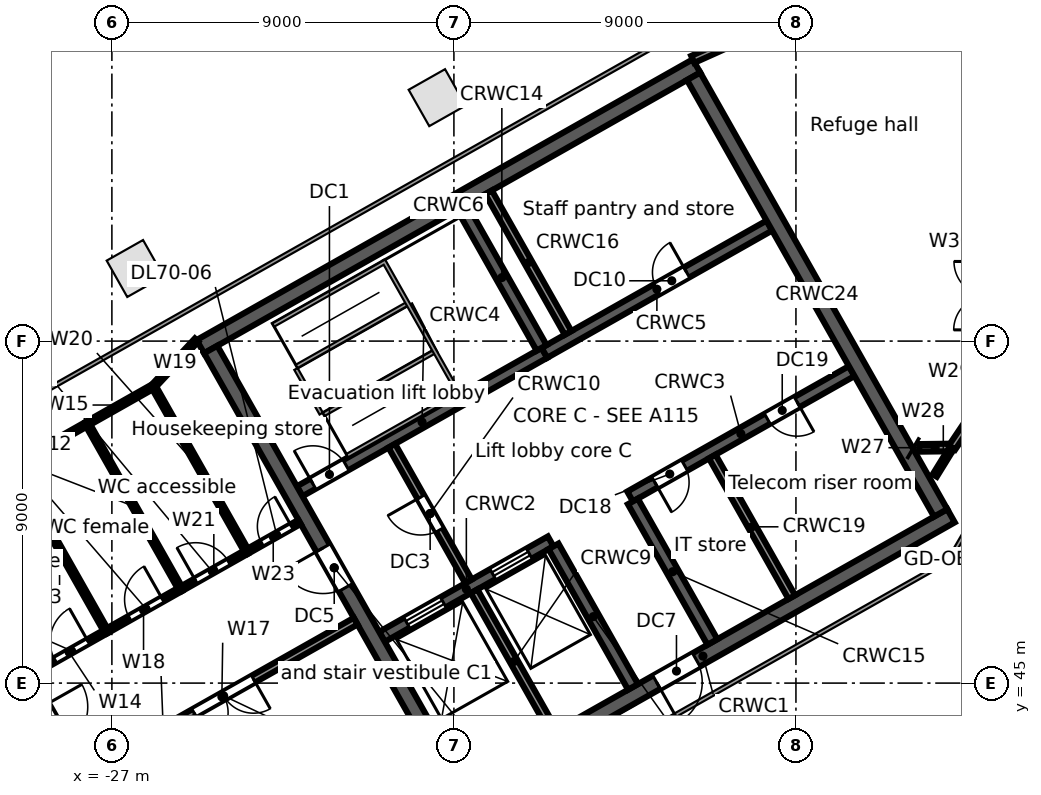
"""IFC4 building model, lengths in metres.
Left out: names, types, materials, properties, quantities, classifications, styles, units other than length and angle.
Written with IfcOpenShell. Run it as: python <this file> out.ifc"""

import sys

from ifc_helpers import new_model, si_unit, direction, frame, frame_2d, origin, origin_2d, place, context, subcontext, project, spatial, rectangle, extrude, element, fill, save


model = new_model("IFC4")
c1 = context("Model", 3, precision=1e-05, world=origin(), true_north=direction((0.0, 1.0)))
c2 = subcontext(c1, "Body", "Model", "MODEL_VIEW")
j1 = project(units=[si_unit("LENGTHUNIT", "METRE"), si_unit("PLANEANGLEUNIT", "RADIAN")], contexts=[c1])
p1 = place(None, origin())
s1 = spatial("IfcSite", under=j1, at=p1, CompositionType="ELEMENT")
p2 = place(p1, origin())
s2 = spatial("IfcBuilding", under=s1, at=p2, CompositionType="ELEMENT")
p3 = place(p2, frame((0.0, 0.0, 312.1)))
s3 = spatial("IfcBuildingStorey", under=s2, at=p3, CompositionType="ELEMENT", Elevation=312.1)
for number, where, z_axis, x_axis in (
    (1, (-18.441, 60.406, 0.0), (0.0, 0.0, 1.0), (-0.87, -0.492, 0.0)),
    (2, (-26.388, 55.91, 0.0), (0.0, 0.0, 1.0), (-0.87, -0.492, 0.0)),
):
    element("IfcColumn", number, at=place(p3, frame(where, z_axis=z_axis, x_axis=x_axis)), inside=s3, PredefinedType="COLUMN", context=c2, shape_type="SweptSolid", body=[
        extrude(rectangle(XDim=1.1, YDim=1.1, at=origin_2d()), origin(), (0.0, 0.0, 1.0), 4.4),
    ])
p4 = place(p3, frame((-31.79, 49.597, 0.0), z_axis=(0.0, 0.0, 1.0), x_axis=(0.492421663121, -0.870356769198, 0.0)))
e3 = element("IfcWall", 3, at=p4, inside=s3, PredefinedType="SOLIDWALL", context=c2, shape_type="SweptSolid", body=[
    extrude(rectangle(XDim=13.2, YDim=0.4, at=frame_2d((6.6, 0.0))), origin(), (0.0, 0.0, 1.0), 4.12),
])
p5 = place(p4, frame((6.0, 0.0, 0.0)))
e4 = element("IfcOpeningElement", 4, at=p5, cuts=e3, PredefinedType="OPENING", context=c2, shape_type="SweptSolid", body=[
    extrude(rectangle(XDim=1.2, YDim=2.1, at=frame_2d((0.6, 1.05))), frame((0.0, 0.21, 0.0), z_axis=(0.0, -1.0, 0.0), x_axis=(1.0, 0.0, 0.0)), (0.0, 0.0, 1.0), 0.42),
])
p6 = place(p3, frame((-17.975, 42.017, 0.0), z_axis=(0.0, 0.0, 1.0), x_axis=(0.87034965173, 0.492434243055, 0.0)))
e5 = element("IfcWall", 5, at=p6, inside=s3, PredefinedType="SOLIDWALL", context=c2, shape_type="SweptSolid", body=[
    extrude(rectangle(XDim=15.0, YDim=0.4, at=frame_2d((7.5, 0.0))), origin(), (0.0, 0.0, 1.0), 4.12),
])
p7 = place(p6, frame((6.1, 0.0, 0.0)))
e6 = element("IfcOpeningElement", 6, at=p7, cuts=e5, PredefinedType="OPENING", context=c2, shape_type="SweptSolid", body=[
    extrude(rectangle(XDim=1.2, YDim=2.1, at=frame_2d((0.6, 1.05))), frame((0.0, 0.21, 0.0), z_axis=(0.0, -1.0, 0.0), x_axis=(1.0, 0.0, 0.0)), (0.0, 0.0, 1.0), 0.42),
])
p8 = place(p3, frame((-19.892, 46.218, 0.0), z_axis=(0.0, 0.0, 1.0), x_axis=(0.870341639186, 0.492448404505, 0.0)))
e7 = element("IfcWall", 7, at=p8, inside=s3, PredefinedType="SOLIDWALL", context=c2, shape_type="SweptSolid", body=[
    extrude(rectangle(XDim=5.1, YDim=0.3, at=frame_2d((2.55, 0.0))), origin(), (0.0, 0.0, 1.0), 4.12),
])
p9 = place(p8, frame((0.75, 0.0, 0.0)))
e8 = element("IfcOpeningElement", 8, at=p9, cuts=e7, PredefinedType="OPENING", context=c2, shape_type="SweptSolid", body=[
    extrude(rectangle(XDim=1.1, YDim=2.1, at=frame_2d((0.55, 1.05))), frame((0.0, 0.16, 0.0), z_axis=(0.0, -1.0, 0.0), x_axis=(1.0, 0.0, 0.0)), (0.0, 0.0, 1.0), 0.32),
])
p10 = place(p8, frame((3.35, 0.0, 0.0)))
e9 = element("IfcOpeningElement", 9, at=p10, cuts=e7, PredefinedType="OPENING", context=c2, shape_type="SweptSolid", body=[
    extrude(rectangle(XDim=1.1, YDim=2.1, at=frame_2d((0.55, 1.05))), frame((0.0, 0.16, 0.0), z_axis=(0.0, -1.0, 0.0), x_axis=(1.0, 0.0, 0.0)), (0.0, 0.0, 1.0), 0.32),
])
p11 = place(p3, frame((-13.365, 49.911, 0.0), z_axis=(0.0, 0.0, 1.0), x_axis=(0.870347618718, 0.492437836272, 0.0)))
e10 = element("IfcWall", 10, at=p11, inside=s3, PredefinedType="SOLIDWALL", context=c2, shape_type="SweptSolid", body=[
    extrude(rectangle(XDim=6.7, YDim=0.3, at=frame_2d((3.35, 0.0))), origin(), (0.0, 0.0, 1.0), 4.12),
])
p12 = place(p11, frame((0.75, 0.0, 0.0)))
e11 = element("IfcOpeningElement", 11, at=p12, cuts=e10, PredefinedType="OPENING", context=c2, shape_type="SweptSolid", body=[
    extrude(rectangle(XDim=0.9, YDim=2.1, at=frame_2d((0.45, 1.05))), frame((0.0, 0.16, 0.0), z_axis=(0.0, -1.0, 0.0), x_axis=(1.0, 0.0, 0.0)), (0.0, 0.0, 1.0), 0.32),
])
p13 = place(p11, frame((4.15, 0.0, 0.0)))
e12 = element("IfcOpeningElement", 12, at=p13, cuts=e10, PredefinedType="OPENING", context=c2, shape_type="SweptSolid", body=[
    extrude(rectangle(XDim=0.9, YDim=2.1, at=frame_2d((0.45, 1.05))), frame((0.0, 0.16, 0.0), z_axis=(0.0, -1.0, 0.0), x_axis=(1.0, 0.0, 0.0)), (0.0, 0.0, 1.0), 0.32),
])
p14 = place(p3, frame((-22.059, 50.047, 0.0), z_axis=(0.0, 0.0, 1.0), x_axis=(0.87035077051, 0.49243226567, 0.0)))
e13 = element("IfcWall", 13, at=p14, inside=s3, PredefinedType="SOLIDWALL", context=c2, shape_type="SweptSolid", body=[
    extrude(rectangle(XDim=7.4, YDim=0.3, at=frame_2d((3.7, 0.0))), origin(), (0.0, 0.0, 1.0), 4.12),
])
p15 = place(p14, frame((0.4, 0.0, 0.0)))
e14 = element("IfcOpeningElement", 14, at=p15, cuts=e13, PredefinedType="OPENING", context=c2, shape_type="SweptSolid", body=[
    extrude(rectangle(XDim=1.0, YDim=2.1, at=frame_2d((0.5, 1.05))), frame((0.0, 0.16, 0.0), z_axis=(0.0, -1.0, 0.0), x_axis=(1.0, 0.0, 0.0)), (0.0, 0.0, 1.0), 0.32),
])
p16 = place(p3, frame((-15.618, 53.691, 0.0), z_axis=(0.0, 0.0, 1.0), x_axis=(0.870362830851, 0.492410948978, 0.0)))
e15 = element("IfcWall", 15, at=p16, inside=s3, PredefinedType="SOLIDWALL", context=c2, shape_type="SweptSolid", body=[
    extrude(rectangle(XDim=6.8, YDim=0.3, at=frame_2d((3.4, 0.0))), origin(), (0.0, 0.0, 1.0), 4.12),
])
p17 = place(p16, frame((3.4, 0.0, 0.0)))
e16 = element("IfcOpeningElement", 16, at=p17, cuts=e15, PredefinedType="OPENING", context=c2, shape_type="SweptSolid", body=[
    extrude(rectangle(XDim=0.9, YDim=2.1, at=frame_2d((0.45, 1.05))), frame((0.0, 0.16, 0.0), z_axis=(0.0, -1.0, 0.0), x_axis=(1.0, 0.0, 0.0)), (0.0, 0.0, 1.0), 0.32),
])
p18 = place(p3, frame((-24.672, 53.854, 0.0), z_axis=(0.0, 0.0, 1.0), x_axis=(0.870353598469, 0.492427267353, 0.0)))
e17 = element("IfcWall", 17, at=p18, inside=s3, PredefinedType="SOLIDWALL", context=c2, shape_type="SweptSolid", body=[
    extrude(rectangle(XDim=15.0, YDim=0.4, at=frame_2d((7.5, 0.0))), origin(), (0.0, 0.0, 1.0), 4.12),
])
p19 = place(p3, frame((-24.4, 53.779, 0.0), z_axis=(0.0, 0.0, 1.0), x_axis=(0.492421663121, -0.870356769198, 0.0)))
e18 = element("IfcWall", 18, at=p19, inside=s3, PredefinedType="SOLIDWALL", context=c2, shape_type="SweptSolid", body=[
    extrude(rectangle(XDim=13.2, YDim=0.4, at=frame_2d((6.6, 0.0))), origin(), (0.0, 0.0, 1.0), 4.12),
])
p20 = place(p19, frame((6.0, 0.0, 0.0)))
e19 = element("IfcOpeningElement", 19, at=p20, cuts=e18, PredefinedType="OPENING", context=c2, shape_type="SweptSolid", body=[
    extrude(rectangle(XDim=1.2, YDim=2.1, at=frame_2d((0.6, 1.05))), frame((0.0, 0.21, 0.0), z_axis=(0.0, -1.0, 0.0), x_axis=(1.0, 0.0, 0.0)), (0.0, 0.0, 1.0), 0.42),
])
p21 = place(p3, frame((-17.469, 47.417, 0.0), z_axis=(0.0, 0.0, 1.0), x_axis=(0.492466057713, -0.870331650579, 0.0)))
e20 = element("IfcWall", 20, at=p21, inside=s3, PredefinedType="SOLIDWALL", context=c2, shape_type="SweptSolid", body=[
    extrude(rectangle(XDim=4.25, YDim=0.2, at=frame_2d((2.125, 0.0))), origin(), (0.0, 0.0, 1.0), 4.12),
])
p22 = place(p3, frame((-19.635, 51.246, 0.0), z_axis=(0.0, 0.0, 1.0), x_axis=(0.492408451753, -0.87036424366, 0.0)))
e21 = element("IfcWall", 21, at=p22, inside=s3, PredefinedType="PARTITIONING", context=c2, shape_type="SweptSolid", body=[
    extrude(rectangle(XDim=4.1, YDim=0.2, at=frame_2d((2.05, 0.0))), origin(), (0.0, 0.0, 1.0), 4.12),
])
p23 = place(p22, frame((1.55, 0.0, 0.0)))
e22 = element("IfcOpeningElement", 22, at=p23, cuts=e21, PredefinedType="OPENING", context=c2, shape_type="SweptSolid", body=[
    extrude(rectangle(XDim=1.0, YDim=2.1, at=frame_2d((0.5, 1.05))), frame((0.0, 0.11, 0.0), z_axis=(0.0, -1.0, 0.0), x_axis=(1.0, 0.0, 0.0)), (0.0, 0.0, 1.0), 0.22),
])
for number, where, z_axis, x_axis in (
    (23, (-15.379, 48.599, 0.0), (0.0, 0.0, 1.0), (0.492, -0.87, 0.0)),
    (24, (-17.785, 57.521, 0.0), (0.0, 0.0, 1.0), (0.492, -0.87, 0.0)),
):
    element("IfcWall", number, at=place(p3, frame(where, z_axis=z_axis, x_axis=x_axis)), inside=s3, PredefinedType="SOLIDWALL", context=c2, shape_type="SweptSolid", body=[
        extrude(rectangle(XDim=4.25, YDim=0.3, at=frame_2d((2.125, 0.0))), origin(), (0.0, 0.0, 1.0), 4.12),
    ])
p24 = place(p3, frame((-13.291, 49.781, 0.0), z_axis=(0.0, 0.0, 1.0), x_axis=(0.492397924348, -0.870370199454, 0.0)))
e25 = element("IfcWall", 25, at=p24, inside=s3, PredefinedType="SOLIDWALL", context=c2, shape_type="SweptSolid", body=[
    extrude(rectangle(XDim=4.25, YDim=0.3, at=frame_2d((2.125, 0.0))), origin(), (0.0, 0.0, 1.0), 4.12),
])
p25 = place(p3, frame((-17.089, 57.915, 0.0), z_axis=(0.0, 0.0, 1.0), x_axis=(0.492422543467, -0.870356271124, 0.0)))
e26 = element("IfcWall", 26, at=p25, inside=s3, PredefinedType="SOLIDWALL", context=c2, shape_type="SweptSolid", body=[
    extrude(rectangle(XDim=4.25, YDim=0.2, at=frame_2d((2.125, 0.0))), origin(), (0.0, 0.0, 1.0), 4.12),
])
p26 = place(p3, frame((-11.202, 50.962, 0.0), z_axis=(0.0, 0.0, 1.0), x_axis=(0.492441437811, -0.870345580977, 0.0)))
e27 = element("IfcWall", 27, at=p26, inside=s3, PredefinedType="PARTITIONING", context=c2, shape_type="SweptSolid", body=[
    extrude(rectangle(XDim=4.25, YDim=0.2, at=frame_2d((2.125, 0.0))), origin(), (0.0, 0.0, 1.0), 4.12),
])
p27 = place(p3, frame((-11.692, 60.968, 0.0), z_axis=(0.0, 0.0, 1.0), x_axis=(0.492421663121, -0.870356769198, 0.0)))
e28 = element("IfcWall", 28, at=p27, inside=s3, PredefinedType="SOLIDWALL", context=c2, shape_type="SweptSolid", body=[
    extrude(rectangle(XDim=13.2, YDim=0.4, at=frame_2d((6.6, 0.0))), origin(), (0.0, 0.0, 1.0), 4.12),
])
p28 = place(p3, frame((-29.608, 50.717, 0.0), z_axis=(0.0, 0.0, 1.0), x_axis=(0.870332332106, 0.492464853254, 0.0)))
e29 = element("IfcWall", 29, at=p28, inside=s3, PredefinedType="PARTITIONING", context=c2, shape_type="SweptSolid", body=[
    extrude(rectangle(XDim=2.25, YDim=0.125, at=frame_2d((1.125, 0.0))), origin(), (0.0, 0.0, 1.0), 4.12),
])
p29 = place(p3, frame((-29.608, 50.717, 0.0), z_axis=(0.0, 0.0, 1.0), x_axis=(0.492369352746, -0.870386362759, 0.0)))
e30 = element("IfcWall", 30, at=p29, inside=s3, PredefinedType="PARTITIONING", context=c2, shape_type="SweptSolid", body=[
    extrude(rectangle(XDim=5.0, YDim=0.125, at=frame_2d((2.5, 0.0))), origin(), (0.0, 0.0, 1.0), 4.12),
])
p30 = place(p3, frame((-29.104, 45.257, 0.0), z_axis=(0.0, 0.0, 1.0), x_axis=(0.870332332106, 0.492464853254, 0.0)))
e31 = element("IfcWall", 31, at=p30, inside=s3, PredefinedType="PARTITIONING", context=c2, shape_type="SweptSolid", body=[
    extrude(rectangle(XDim=2.25, YDim=0.125, at=frame_2d((1.125, 0.0))), origin(), (0.0, 0.0, 1.0), 4.12),
])
p31 = place(p30, frame((0.7, 0.0, 0.0)))
e32 = element("IfcOpeningElement", 32, at=p31, cuts=e31, PredefinedType="OPENING", context=c2, shape_type="SweptSolid", body=[
    extrude(rectangle(XDim=1.0, YDim=2.1, at=frame_2d((0.5, 1.05))), frame((0.0, 0.073, 0.0), z_axis=(0.0, -1.0, 0.0), x_axis=(1.0, 0.0, 0.0)), (0.0, 0.0, 1.0), 0.145),
])
p32 = place(p3, frame((-27.65, 51.825, 0.0), z_axis=(0.0, 0.0, 1.0), x_axis=(0.870330884088, 0.492467412326, 0.0)))
e33 = element("IfcWall", 33, at=p32, inside=s3, PredefinedType="PARTITIONING", context=c2, shape_type="SweptSolid", body=[
    extrude(rectangle(XDim=2.0, YDim=0.125, at=frame_2d((1.0, 0.0))), origin(), (0.0, 0.0, 1.0), 4.12),
])
p33 = place(p3, frame((-27.65, 51.825, 0.0), z_axis=(0.0, 0.0, 1.0), x_axis=(0.492369352746, -0.870386362759, 0.0)))
e34 = element("IfcWall", 34, at=p33, inside=s3, PredefinedType="PARTITIONING", context=c2, shape_type="SweptSolid", body=[
    extrude(rectangle(XDim=5.0, YDim=0.125, at=frame_2d((2.5, 0.0))), origin(), (0.0, 0.0, 1.0), 4.12),
])
p34 = place(p3, frame((-27.627, 42.646, 0.0), z_axis=(0.0, 0.0, 1.0), x_axis=(0.870370568162, 0.492397272614, 0.0)))
e35 = element("IfcWall", 35, at=p34, inside=s3, PredefinedType="PARTITIONING", context=c2, shape_type="SweptSolid", body=[
    extrude(rectangle(XDim=8.091, YDim=0.2, at=frame_2d((4.045, 0.0))), origin(), (0.0, 0.0, 1.0), 3.392),
])
p35 = place(p34, frame((3.2, 0.0, 0.0)))
e36 = element("IfcOpeningElement", 36, at=p35, cuts=e35, PredefinedType="OPENING", context=c2, shape_type="SweptSolid", body=[
    extrude(rectangle(XDim=1.8, YDim=2.1, at=frame_2d((0.9, 1.05))), frame((0.0, 0.11, 0.0), z_axis=(0.0, -1.0, 0.0), x_axis=(1.0, 0.0, 0.0)), (0.0, 0.0, 1.0), 0.22),
])
p36 = place(p3, frame((-27.146, 46.365, 0.0), z_axis=(0.0, 0.0, 1.0), x_axis=(0.870332332106, 0.492464853254, 0.0)))
e37 = element("IfcWall", 37, at=p36, inside=s3, PredefinedType="PARTITIONING", context=c2, shape_type="SweptSolid", body=[
    extrude(rectangle(XDim=2.25, YDim=0.125, at=frame_2d((1.125, 0.0))), origin(), (0.0, 0.0, 1.0), 4.12),
])
p37 = place(p36, frame((0.7, 0.0, 0.0)))
e38 = element("IfcOpeningElement", 38, at=p37, cuts=e37, PredefinedType="OPENING", context=c2, shape_type="SweptSolid", body=[
    extrude(rectangle(XDim=1.0, YDim=2.1, at=frame_2d((0.5, 1.05))), frame((0.0, 0.073, 0.0), z_axis=(0.0, -1.0, 0.0), x_axis=(1.0, 0.0, 0.0)), (0.0, 0.0, 1.0), 0.145),
])
p38 = place(p3, frame((-25.909, 52.81, 0.0), z_axis=(0.0, 0.0, 1.0), x_axis=(0.682678244456, 0.730719107829, 0.0)))
e39 = element("IfcWall", 39, at=p38, inside=s3, PredefinedType="PARTITIONING", context=c2, shape_type="SweptSolid", body=[
    extrude(rectangle(XDim=1.667, YDim=0.125, at=frame_2d((0.833, 0.0))), origin(), (0.0, 0.0, 1.0), 3.392),
])
p39 = place(p3, frame((-25.909, 52.81, 0.0), z_axis=(0.0, 0.0, 1.0), x_axis=(0.492369352746, -0.870386362759, 0.0)))
e40 = element("IfcWall", 40, at=p39, inside=s3, PredefinedType="PARTITIONING", context=c2, shape_type="SweptSolid", body=[
    extrude(rectangle(XDim=5.0, YDim=0.125, at=frame_2d((2.5, 0.0))), origin(), (0.0, 0.0, 1.0), 4.12),
])
p40 = place(p3, frame((-25.188, 47.473, 0.0), z_axis=(0.0, 0.0, 1.0), x_axis=(0.870330884088, 0.492467412326, 0.0)))
e41 = element("IfcWall", 41, at=p40, inside=s3, PredefinedType="PARTITIONING", context=c2, shape_type="SweptSolid", body=[
    extrude(rectangle(XDim=2.0, YDim=0.125, at=frame_2d((1.0, 0.0))), origin(), (0.0, 0.0, 1.0), 4.12),
])
p41 = place(p40, frame((0.45, 0.0, 0.0)))
e42 = element("IfcOpeningElement", 42, at=p41, cuts=e41, PredefinedType="OPENING", context=c2, shape_type="SweptSolid", body=[
    extrude(rectangle(XDim=1.0, YDim=2.1, at=frame_2d((0.5, 1.05))), frame((0.0, 0.073, 0.0), z_axis=(0.0, -1.0, 0.0), x_axis=(1.0, 0.0, 0.0)), (0.0, 0.0, 1.0), 0.145),
])
p42 = place(p3, frame((-23.447, 48.458, 0.0), z_axis=(0.0, 0.0, 1.0), x_axis=(0.870528540927, 0.492117932443, 0.0)))
e43 = element("IfcWall", 43, at=p42, inside=s3, PredefinedType="PARTITIONING", context=c2, shape_type="SweptSolid", body=[
    extrude(rectangle(XDim=1.591, YDim=0.125, at=frame_2d((0.795, 0.0))), origin(), (0.0, 0.0, 1.0), 3.392),
])
p43 = place(p42, frame((0.45, 0.0, 0.0)))
e44 = element("IfcOpeningElement", 44, at=p43, cuts=e43, PredefinedType="OPENING", context=c2, shape_type="SweptSolid", body=[
    extrude(rectangle(XDim=0.9, YDim=2.1, at=frame_2d((0.45, 1.05))), frame((0.0, 0.073, 0.0), z_axis=(0.0, -1.0, 0.0), x_axis=(1.0, 0.0, 0.0)), (0.0, 0.0, 1.0), 0.145),
])
p44 = place(p3, frame((-11.715, 61.414, 0.0), z_axis=(0.0, 0.0, 1.0), x_axis=(0.911945048706, 0.410312354361, 0.0)))
e45 = element("IfcWall", 45, at=p44, inside=s3, PredefinedType="PARTITIONING", context=c2, shape_type="SweptSolid", body=[
    extrude(rectangle(XDim=5.432, YDim=0.2, at=frame_2d((2.716, 0.0))), origin(), (0.0, 0.0, 1.0), 4.12),
])
p45 = place(p3, frame((-5.758, 51.19, 0.0), z_axis=(0.0, 0.0, 1.0), x_axis=(0.999929677687, 0.011859160192, 0.0)))
e46 = element("IfcWall", 46, at=p45, inside=s3, PredefinedType="PARTITIONING", context=c2, shape_type="SweptSolid", body=[
    extrude(rectangle(XDim=0.844, YDim=0.2, at=frame_2d((0.422, 0.0))), origin(), (0.0, 0.0, 1.0), 3.886),
])
p46 = place(p3, frame((-5.347, 50.463, 0.0), z_axis=(0.0, 0.0, 1.0), x_axis=(0.525419885988, 0.850843078016, 0.0)))
e47 = element("IfcWall", 47, at=p46, inside=s3, PredefinedType="PARTITIONING", context=c2, shape_type="SweptSolid", body=[
    extrude(rectangle(XDim=0.854, YDim=0.125, at=frame_2d((0.427, 0.0))), origin(), (0.0, 0.0, 1.0), 3.886),
])
p47 = place(p3, frame((-4.892, 51.2, 0.0), z_axis=(0.0, 0.0, 1.0), x_axis=(0.557987221871, 0.829849540717, 0.0)))
e48 = element("IfcWall", 48, at=p47, inside=s3, PredefinedType="PARTITIONING", context=c2, shape_type="SweptSolid", body=[
    extrude(rectangle(XDim=1.677, YDim=0.2, at=frame_2d((0.839, 0.0))), origin(), (0.0, 0.0, 1.0), 4.12),
])
p48 = place(p5, origin())
e49 = element("IfcDoor", 49, at=p48, inside=s3, OperationType="SINGLE_SWING_LEFT", PredefinedType="DOOR", context=c2, shape_type="SweptSolid", body=[
    extrude(rectangle(XDim=1.2, YDim=2.1, at=frame_2d((0.6, 1.05))), frame((0.0, 0.025, 0.0), z_axis=(0.0, -1.0, 0.0), x_axis=(1.0, 0.0, 0.0)), (0.0, 0.0, 1.0), 0.05),
])
fill(e4, e49)
p49 = place(p9, origin())
e50 = element("IfcDoor", 50, at=p49, inside=s3, OperationType="DOUBLE_DOOR_SLIDING", PredefinedType="DOOR", context=c2, shape_type="SweptSolid", body=[
    extrude(rectangle(XDim=1.1, YDim=2.1, at=frame_2d((0.55, 1.05))), frame((0.0, 0.025, 0.0), z_axis=(0.0, -1.0, 0.0), x_axis=(1.0, 0.0, 0.0)), (0.0, 0.0, 1.0), 0.05),
])
fill(e8, e50)
p50 = place(p10, origin())
e51 = element("IfcDoor", 51, at=p50, inside=s3, OperationType="DOUBLE_DOOR_SLIDING", PredefinedType="DOOR", context=c2, shape_type="SweptSolid", body=[
    extrude(rectangle(XDim=1.1, YDim=2.1, at=frame_2d((0.55, 1.05))), frame((0.0, 0.025, 0.0), z_axis=(0.0, -1.0, 0.0), x_axis=(1.0, 0.0, 0.0)), (0.0, 0.0, 1.0), 0.05),
])
fill(e9, e51)
p51 = place(p15, origin())
e52 = element("IfcDoor", 52, at=p51, inside=s3, OperationType="SINGLE_SWING_LEFT", PredefinedType="DOOR", context=c2, shape_type="SweptSolid", body=[
    extrude(rectangle(XDim=1.0, YDim=2.1, at=frame_2d((0.5, 1.05))), frame((0.0, 0.025, 0.0), z_axis=(0.0, -1.0, 0.0), x_axis=(1.0, 0.0, 0.0)), (0.0, 0.0, 1.0), 0.05),
])
fill(e14, e52)
p52 = place(p23, frame((1.0, 0.0, 0.0), z_axis=(0.0, 0.0, 1.0), x_axis=(-1.0, 0.0, 0.0)))
e53 = element("IfcDoor", 53, at=p52, inside=s3, OperationType="SINGLE_SWING_RIGHT", PredefinedType="DOOR", context=c2, shape_type="SweptSolid", body=[
    extrude(rectangle(XDim=1.0, YDim=2.1, at=frame_2d((0.5, 1.05))), frame((0.0, 0.025, 0.0), z_axis=(0.0, -1.0, 0.0), x_axis=(1.0, 0.0, 0.0)), (0.0, 0.0, 1.0), 0.05),
])
fill(e22, e53)
p53 = place(p20, frame((1.2, 0.0, 0.0), z_axis=(0.0, 0.0, 1.0), x_axis=(-1.0, 0.0, 0.0)))
e54 = element("IfcDoor", 54, at=p53, inside=s3, OperationType="SINGLE_SWING_RIGHT", PredefinedType="DOOR", context=c2, shape_type="SweptSolid", body=[
    extrude(rectangle(XDim=1.2, YDim=2.1, at=frame_2d((0.6, 1.05))), frame((0.0, 0.025, 0.0), z_axis=(0.0, -1.0, 0.0), x_axis=(1.0, 0.0, 0.0)), (0.0, 0.0, 1.0), 0.05),
])
fill(e19, e54)
p54 = place(p7, frame((1.2, 0.0, 0.0), z_axis=(0.0, 0.0, 1.0), x_axis=(-1.0, 0.0, 0.0)))
e55 = element("IfcDoor", 55, at=p54, inside=s3, OperationType="SINGLE_SWING_RIGHT", PredefinedType="DOOR", context=c2, shape_type="SweptSolid", body=[
    extrude(rectangle(XDim=1.2, YDim=2.1, at=frame_2d((0.6, 1.05))), frame((0.0, 0.025, 0.0), z_axis=(0.0, -1.0, 0.0), x_axis=(1.0, 0.0, 0.0)), (0.0, 0.0, 1.0), 0.05),
])
fill(e6, e55)
p55 = place(p17, origin())
e56 = element("IfcDoor", 56, at=p55, inside=s3, OperationType="SINGLE_SWING_RIGHT", PredefinedType="DOOR", context=c2, shape_type="SweptSolid", body=[
    extrude(rectangle(XDim=0.9, YDim=2.1, at=frame_2d((0.45, 1.05))), frame((0.0, 0.025, 0.0), z_axis=(0.0, -1.0, 0.0), x_axis=(1.0, 0.0, 0.0)), (0.0, 0.0, 1.0), 0.05),
])
fill(e16, e56)
p56 = place(p12, frame((0.9, 0.0, 0.0), z_axis=(0.0, 0.0, 1.0), x_axis=(-1.0, 0.0, 0.0)))
e57 = element("IfcDoor", 57, at=p56, inside=s3, OperationType="SINGLE_SWING_RIGHT", PredefinedType="DOOR", context=c2, shape_type="SweptSolid", body=[
    extrude(rectangle(XDim=0.9, YDim=2.1, at=frame_2d((0.45, 1.05))), frame((0.0, 0.025, 0.0), z_axis=(0.0, -1.0, 0.0), x_axis=(1.0, 0.0, 0.0)), (0.0, 0.0, 1.0), 0.05),
])
fill(e11, e57)
p57 = place(p13, frame((0.9, 0.0, 0.0), z_axis=(0.0, 0.0, 1.0), x_axis=(-1.0, 0.0, 0.0)))
e58 = element("IfcDoor", 58, at=p57, inside=s3, OperationType="SINGLE_SWING_LEFT", PredefinedType="DOOR", context=c2, shape_type="SweptSolid", body=[
    extrude(rectangle(XDim=0.9, YDim=2.1, at=frame_2d((0.45, 1.05))), frame((0.0, 0.025, 0.0), z_axis=(0.0, -1.0, 0.0), x_axis=(1.0, 0.0, 0.0)), (0.0, 0.0, 1.0), 0.05),
])
fill(e12, e58)
p58 = place(p31, origin())
e59 = element("IfcDoor", 59, at=p58, inside=s3, OperationType="SINGLE_SWING_RIGHT", PredefinedType="DOOR", context=c2, shape_type="SweptSolid", body=[
    extrude(rectangle(XDim=1.0, YDim=2.1, at=frame_2d((0.5, 1.05))), frame((0.0, 0.025, 0.0), z_axis=(0.0, -1.0, 0.0), x_axis=(1.0, 0.0, 0.0)), (0.0, 0.0, 1.0), 0.05),
])
fill(e32, e59)
p59 = place(p37, origin())
e60 = element("IfcDoor", 60, at=p59, inside=s3, OperationType="SINGLE_SWING_RIGHT", PredefinedType="DOOR", context=c2, shape_type="SweptSolid", body=[
    extrude(rectangle(XDim=1.0, YDim=2.1, at=frame_2d((0.5, 1.05))), frame((0.0, 0.025, 0.0), z_axis=(0.0, -1.0, 0.0), x_axis=(1.0, 0.0, 0.0)), (0.0, 0.0, 1.0), 0.05),
])
fill(e38, e60)
p60 = place(p41, origin())
e61 = element("IfcDoor", 61, at=p60, inside=s3, OperationType="SINGLE_SWING_LEFT", PredefinedType="DOOR", context=c2, shape_type="SweptSolid", body=[
    extrude(rectangle(XDim=1.0, YDim=2.1, at=frame_2d((0.5, 1.05))), frame((0.0, 0.025, 0.0), z_axis=(0.0, -1.0, 0.0), x_axis=(1.0, 0.0, 0.0)), (0.0, 0.0, 1.0), 0.05),
])
fill(e42, e61)
p61 = place(p43, origin())
e62 = element("IfcDoor", 62, at=p61, inside=s3, OperationType="SINGLE_SWING_RIGHT", PredefinedType="DOOR", context=c2, shape_type="SweptSolid", body=[
    extrude(rectangle(XDim=0.9, YDim=2.1, at=frame_2d((0.45, 1.05))), frame((0.0, 0.025, 0.0), z_axis=(0.0, -1.0, 0.0), x_axis=(1.0, 0.0, 0.0)), (0.0, 0.0, 1.0), 0.05),
])
fill(e44, e62)
p62 = place(p35, frame((1.8, 0.0, 0.0), z_axis=(0.0, 0.0, 1.0), x_axis=(-1.0, 0.0, 0.0)))
e63 = element("IfcDoor", 63, at=p62, inside=s3, OperationType="DOUBLE_DOOR_SINGLE_SWING", PredefinedType="DOOR", context=c2, shape_type="SweptSolid", body=[
    extrude(rectangle(XDim=1.8, YDim=2.1, at=frame_2d((0.9, 1.05))), frame((0.0, 0.025, 0.0), z_axis=(0.0, -1.0, 0.0), x_axis=(1.0, 0.0, 0.0)), (0.0, 0.0, 1.0), 0.05),
])
fill(e36, e63)
save(model, sys.argv[1])
